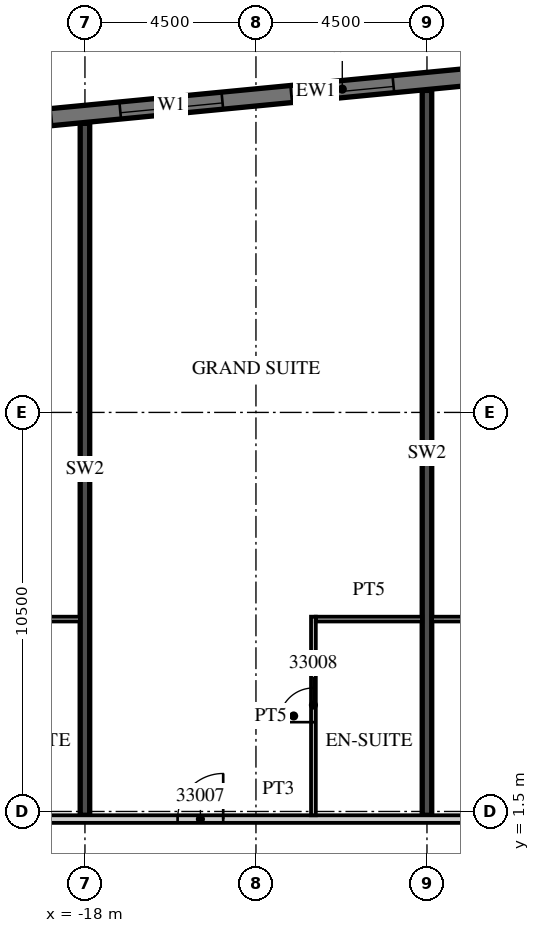
"""IFC4 building model, lengths in metres.
Left out: names, types, materials, properties, quantities, classifications, styles, units other than length and angle.
Written with IfcOpenShell. Run it as: python <this file> out.ifc"""

import sys

from ifc_helpers import new_model, si_unit, direction, frame, frame_2d, origin, place, context, subcontext, project, spatial, rectangle, extrude, element, fill, save


model = new_model("IFC4")
c1 = context("Model", 3, precision=1e-05, world=origin(), true_north=direction((0.0, 1.0)))
c2 = subcontext(c1, "Body", "Model", "MODEL_VIEW")
j1 = project(units=[si_unit("LENGTHUNIT", "METRE"), si_unit("PLANEANGLEUNIT", "RADIAN")], contexts=[c1])
p1 = place(None, origin())
s1 = spatial("IfcSite", under=j1, at=p1, CompositionType="ELEMENT")
p2 = place(p1, origin())
s2 = spatial("IfcBuilding", under=s1, at=p2, CompositionType="ELEMENT")
p3 = place(p2, frame((0.0, 0.0, 143.8)))
s3 = spatial("IfcBuildingStorey", under=s2, at=p3, CompositionType="ELEMENT", Elevation=143.8)
p4 = place(p3, frame((-18.0, 1.4, 0.0), z_axis=(0.0, 0.0, 1.0), x_axis=(0.0, 1.0, 0.0)))
e1 = element("IfcWall", 1, at=p4, inside=s3, PredefinedType="SHEAR", context=c2, shape_type="SweptSolid", body=[
    extrude(rectangle(XDim=18.207, YDim=0.25, at=frame_2d((9.104, 0.0))), origin(), (0.0, 0.0, 1.0), 3.3),
])
p5 = place(p3, frame((-9.0, 1.4, 0.0), z_axis=(0.0, 0.0, 1.0), x_axis=(0.0, 1.0, 0.0)))
e2 = element("IfcWall", 2, at=p5, inside=s3, PredefinedType="SHEAR", context=c2, shape_type="SweptSolid", body=[
    extrude(rectangle(XDim=19.073, YDim=0.25, at=frame_2d((9.537, 0.0))), origin(), (0.0, 0.0, 1.0), 3.3),
])
p6 = place(p3, frame((13.521, 22.89, 0.0), z_axis=(0.0, 0.0, 1.0), x_axis=(-0.995396445054, -0.095843190545, 0.0)))
e3 = element("IfcWall", 3, at=p6, inside=s3, PredefinedType="SOLIDWALL", context=c2, shape_type="SweptSolid", body=[
    extrude(rectangle(XDim=51.114, YDim=0.45, at=frame_2d((25.557, 0.0))), origin(), (0.0, 0.0, 1.0), 3.02),
])
p7 = place(p6, frame((0.91, 0.0, 0.45)))
e4 = element("IfcOpeningElement", 4, at=p7, cuts=e3, PredefinedType="OPENING", context=c2, shape_type="SweptSolid", body=[
    extrude(rectangle(XDim=2.7, YDim=2.25, at=frame_2d((1.35, 1.125))), frame((0.0, 0.235, 0.0), z_axis=(0.0, -1.0, 0.0), x_axis=(1.0, 0.0, 0.0)), (0.0, 0.0, 1.0), 0.47),
])
p8 = place(p6, frame((5.431, 0.0, 0.45)))
e5 = element("IfcOpeningElement", 5, at=p8, cuts=e3, PredefinedType="OPENING", context=c2, shape_type="SweptSolid", body=[
    extrude(rectangle(XDim=2.7, YDim=2.25, at=frame_2d((1.35, 1.125))), frame((0.0, 0.235, 0.0), z_axis=(0.0, -1.0, 0.0), x_axis=(1.0, 0.0, 0.0)), (0.0, 0.0, 1.0), 0.47),
])
p9 = place(p6, frame((9.952, 0.0, 0.45)))
e6 = element("IfcOpeningElement", 6, at=p9, cuts=e3, PredefinedType="OPENING", context=c2, shape_type="SweptSolid", body=[
    extrude(rectangle(XDim=2.7, YDim=2.25, at=frame_2d((1.35, 1.125))), frame((0.0, 0.235, 0.0), z_axis=(0.0, -1.0, 0.0), x_axis=(1.0, 0.0, 0.0)), (0.0, 0.0, 1.0), 0.47),
])
p10 = place(p6, frame((14.473, 0.0, 0.45)))
e7 = element("IfcOpeningElement", 7, at=p10, cuts=e3, PredefinedType="OPENING", context=c2, shape_type="SweptSolid", body=[
    extrude(rectangle(XDim=2.7, YDim=2.25, at=frame_2d((1.35, 1.125))), frame((0.0, 0.235, 0.0), z_axis=(0.0, -1.0, 0.0), x_axis=(1.0, 0.0, 0.0)), (0.0, 0.0, 1.0), 0.47),
])
p11 = place(p6, frame((18.994, 0.0, 0.45)))
e8 = element("IfcOpeningElement", 8, at=p11, cuts=e3, PredefinedType="OPENING", context=c2, shape_type="SweptSolid", body=[
    extrude(rectangle(XDim=2.7, YDim=2.25, at=frame_2d((1.35, 1.125))), frame((0.0, 0.235, 0.0), z_axis=(0.0, -1.0, 0.0), x_axis=(1.0, 0.0, 0.0)), (0.0, 0.0, 1.0), 0.47),
])
p12 = place(p6, frame((23.514, 0.0, 0.45)))
e9 = element("IfcOpeningElement", 9, at=p12, cuts=e3, PredefinedType="OPENING", context=c2, shape_type="SweptSolid", body=[
    extrude(rectangle(XDim=2.7, YDim=2.25, at=frame_2d((1.35, 1.125))), frame((0.0, 0.235, 0.0), z_axis=(0.0, -1.0, 0.0), x_axis=(1.0, 0.0, 0.0)), (0.0, 0.0, 1.0), 0.47),
])
p13 = place(p6, frame((28.035, 0.0, 0.45)))
e10 = element("IfcOpeningElement", 10, at=p13, cuts=e3, PredefinedType="OPENING", context=c2, shape_type="SweptSolid", body=[
    extrude(rectangle(XDim=2.7, YDim=2.25, at=frame_2d((1.35, 1.125))), frame((0.0, 0.235, 0.0), z_axis=(0.0, -1.0, 0.0), x_axis=(1.0, 0.0, 0.0)), (0.0, 0.0, 1.0), 0.47),
])
p14 = place(p6, frame((32.556, 0.0, 0.45)))
e11 = element("IfcOpeningElement", 11, at=p14, cuts=e3, PredefinedType="OPENING", context=c2, shape_type="SweptSolid", body=[
    extrude(rectangle(XDim=2.7, YDim=2.25, at=frame_2d((1.35, 1.125))), frame((0.0, 0.235, 0.0), z_axis=(0.0, -1.0, 0.0), x_axis=(1.0, 0.0, 0.0)), (0.0, 0.0, 1.0), 0.47),
])
p15 = place(p6, frame((37.077, 0.0, 0.45)))
e12 = element("IfcOpeningElement", 12, at=p15, cuts=e3, PredefinedType="OPENING", context=c2, shape_type="SweptSolid", body=[
    extrude(rectangle(XDim=2.7, YDim=2.25, at=frame_2d((1.35, 1.125))), frame((0.0, 0.235, 0.0), z_axis=(0.0, -1.0, 0.0), x_axis=(1.0, 0.0, 0.0)), (0.0, 0.0, 1.0), 0.47),
])
p16 = place(p6, frame((41.598, 0.0, 0.45)))
e13 = element("IfcOpeningElement", 13, at=p16, cuts=e3, PredefinedType="OPENING", context=c2, shape_type="SweptSolid", body=[
    extrude(rectangle(XDim=2.7, YDim=2.25, at=frame_2d((1.35, 1.125))), frame((0.0, 0.235, 0.0), z_axis=(0.0, -1.0, 0.0), x_axis=(1.0, 0.0, 0.0)), (0.0, 0.0, 1.0), 0.47),
])
p17 = place(p6, frame((46.118, 0.0, 0.45)))
e14 = element("IfcOpeningElement", 14, at=p17, cuts=e3, PredefinedType="OPENING", context=c2, shape_type="SweptSolid", body=[
    extrude(rectangle(XDim=2.7, YDim=2.25, at=frame_2d((1.35, 1.125))), frame((0.0, 0.235, 0.0), z_axis=(0.0, -1.0, 0.0), x_axis=(1.0, 0.0, 0.0)), (0.0, 0.0, 1.0), 0.47),
])
p18 = place(p3, frame((-39.316, 1.3, 0.0), z_axis=(0.0, 0.0, 1.0), x_axis=(1.0, 0.0, 0.0)))
e15 = element("IfcWall", 15, at=p18, inside=s3, PredefinedType="PARTITIONING", context=c2, shape_type="SweptSolid", body=[
    extrude(rectangle(XDim=52.816, YDim=0.2, at=frame_2d((26.408, 0.0))), origin(), (0.0, 0.0, 1.0), 3.02),
])
p19 = place(p18, frame((0.15, 0.0, 0.0)))
e16 = element("IfcOpeningElement", 16, at=p19, cuts=e15, PredefinedType="OPENING", context=c2, shape_type="SweptSolid", body=[
    extrude(rectangle(XDim=0.9, YDim=2.1, at=frame_2d((0.45, 1.05))), frame((0.0, 0.11, 0.0), z_axis=(0.0, -1.0, 0.0), x_axis=(1.0, 0.0, 0.0)), (0.0, 0.0, 1.0), 0.22),
])
p20 = place(p18, frame((5.754, 0.0, 0.0)))
e17 = element("IfcOpeningElement", 17, at=p20, cuts=e15, PredefinedType="OPENING", context=c2, shape_type="SweptSolid", body=[
    extrude(rectangle(XDim=1.2, YDim=2.1, at=frame_2d((0.6, 1.05))), frame((0.0, 0.11, 0.0), z_axis=(0.0, -1.0, 0.0), x_axis=(1.0, 0.0, 0.0)), (0.0, 0.0, 1.0), 0.22),
])
p21 = place(p18, frame((14.754, 0.0, 0.0)))
e18 = element("IfcOpeningElement", 18, at=p21, cuts=e15, PredefinedType="OPENING", context=c2, shape_type="SweptSolid", body=[
    extrude(rectangle(XDim=1.2, YDim=2.1, at=frame_2d((0.6, 1.05))), frame((0.0, 0.11, 0.0), z_axis=(0.0, -1.0, 0.0), x_axis=(1.0, 0.0, 0.0)), (0.0, 0.0, 1.0), 0.22),
])
p22 = place(p18, frame((23.754, 0.0, 0.0)))
e19 = element("IfcOpeningElement", 19, at=p22, cuts=e15, PredefinedType="OPENING", context=c2, shape_type="SweptSolid", body=[
    extrude(rectangle(XDim=1.2, YDim=2.1, at=frame_2d((0.6, 1.05))), frame((0.0, 0.11, 0.0), z_axis=(0.0, -1.0, 0.0), x_axis=(1.0, 0.0, 0.0)), (0.0, 0.0, 1.0), 0.22),
])
p23 = place(p18, frame((35.678, 0.0, 0.0)))
e20 = element("IfcOpeningElement", 20, at=p23, cuts=e15, PredefinedType="OPENING", context=c2, shape_type="SweptSolid", body=[
    extrude(rectangle(XDim=1.2, YDim=2.1, at=frame_2d((0.6, 1.05))), frame((0.0, 0.11, 0.0), z_axis=(0.0, -1.0, 0.0), x_axis=(1.0, 0.0, 0.0)), (0.0, 0.0, 1.0), 0.22),
])
p24 = place(p18, frame((44.678, 0.0, 0.0)))
e21 = element("IfcOpeningElement", 21, at=p24, cuts=e15, PredefinedType="OPENING", context=c2, shape_type="SweptSolid", body=[
    extrude(rectangle(XDim=1.2, YDim=2.1, at=frame_2d((0.6, 1.05))), frame((0.0, 0.11, 0.0), z_axis=(0.0, -1.0, 0.0), x_axis=(1.0, 0.0, 0.0)), (0.0, 0.0, 1.0), 0.22),
])
p25 = place(p18, frame((51.241, 0.0, 0.0)))
e22 = element("IfcOpeningElement", 22, at=p25, cuts=e15, PredefinedType="OPENING", context=c2, shape_type="SweptSolid", body=[
    extrude(rectangle(XDim=1.0, YDim=2.1, at=frame_2d((0.5, 1.05))), frame((0.0, 0.11, 0.0), z_axis=(0.0, -1.0, 0.0), x_axis=(1.0, 0.0, 0.0)), (0.0, 0.0, 1.0), 0.22),
])
p26 = place(p3, frame((-20.925, 6.562, 0.0), z_axis=(0.0, 0.0, 1.0), x_axis=(1.0, 0.0, 0.0)))
e23 = element("IfcWall", 23, at=p26, inside=s3, PredefinedType="PARTITIONING", context=c2, shape_type="SweptSolid", body=[
    extrude(rectangle(XDim=2.8, YDim=0.125, at=frame_2d((1.4, 0.0))), origin(), (0.0, 0.0, 1.0), 3.02),
])
p27 = place(p3, frame((-11.988, 1.4, 0.0), z_axis=(0.0, 0.0, 1.0), x_axis=(0.0, 1.0, 0.0)))
e24 = element("IfcWall", 24, at=p27, inside=s3, PredefinedType="PARTITIONING", context=c2, shape_type="SweptSolid", body=[
    extrude(rectangle(XDim=5.225, YDim=0.125, at=frame_2d((2.613, 0.0))), origin(), (0.0, 0.0, 1.0), 3.02),
])
p28 = place(p27, frame((2.45, 0.0, 0.0)))
e25 = element("IfcOpeningElement", 25, at=p28, cuts=e24, PredefinedType="OPENING", context=c2, shape_type="SweptSolid", body=[
    extrude(rectangle(XDim=0.9, YDim=2.1, at=frame_2d((0.45, 1.05))), frame((0.0, 0.073, 0.0), z_axis=(0.0, -1.0, 0.0), x_axis=(1.0, 0.0, 0.0)), (0.0, 0.0, 1.0), 0.145),
])
for number, where, z_axis, x_axis in (
    (26, (-11.925, 6.562, 0.0), (0.0, 0.0, 1.0), (1.0, 0.0, 0.0)),
    (27, (-8.875, 6.562, 0.0), (0.0, 0.0, 1.0), (1.0, 0.0, 0.0)),
):
    element("IfcWall", number, at=place(p3, frame(where, z_axis=z_axis, x_axis=x_axis)), inside=s3, PredefinedType="PARTITIONING", context=c2, shape_type="SweptSolid", body=[
        extrude(rectangle(XDim=2.8, YDim=0.125, at=frame_2d((1.4, 0.0))), origin(), (0.0, 0.0, 1.0), 3.02),
    ])
p29 = place(p12, origin())
e28 = element("IfcWindow", 28, at=p29, inside=s3, PartitioningType="SINGLE_PANEL", PredefinedType="WINDOW", context=c2, shape_type="SweptSolid", body=[
    extrude(rectangle(XDim=2.7, YDim=2.25, at=frame_2d((1.35, 1.125))), frame((0.0, 0.09, 0.0), z_axis=(0.0, -1.0, 0.0), x_axis=(1.0, 0.0, 0.0)), (0.0, 0.0, 1.0), 0.06),
])
fill(e9, e28)
p30 = place(p13, origin())
e29 = element("IfcWindow", 29, at=p30, inside=s3, PartitioningType="SINGLE_PANEL", PredefinedType="WINDOW", context=c2, shape_type="SweptSolid", body=[
    extrude(rectangle(XDim=2.7, YDim=2.25, at=frame_2d((1.35, 1.125))), frame((0.0, 0.09, 0.0), z_axis=(0.0, -1.0, 0.0), x_axis=(1.0, 0.0, 0.0)), (0.0, 0.0, 1.0), 0.06),
])
fill(e10, e29)
p31 = place(p22, origin())
e30 = element("IfcDoor", 30, at=p31, inside=s3, OperationType="SINGLE_SWING_RIGHT", PredefinedType="DOOR", context=c2, shape_type="SweptSolid", body=[
    extrude(rectangle(XDim=1.2, YDim=2.1, at=frame_2d((0.6, 1.05))), frame((0.0, 0.025, 0.0), z_axis=(0.0, -1.0, 0.0), x_axis=(1.0, 0.0, 0.0)), (0.0, 0.0, 1.0), 0.05),
])
fill(e19, e30)
p32 = place(p28, origin())
e31 = element("IfcDoor", 31, at=p32, inside=s3, OperationType="SINGLE_SWING_LEFT", PredefinedType="DOOR", context=c2, shape_type="SweptSolid", body=[
    extrude(rectangle(XDim=0.9, YDim=2.1, at=frame_2d((0.45, 1.05))), frame((0.0, 0.025, 0.0), z_axis=(0.0, -1.0, 0.0), x_axis=(1.0, 0.0, 0.0)), (0.0, 0.0, 1.0), 0.05),
])
fill(e25, e31)
save(model, sys.argv[1])
